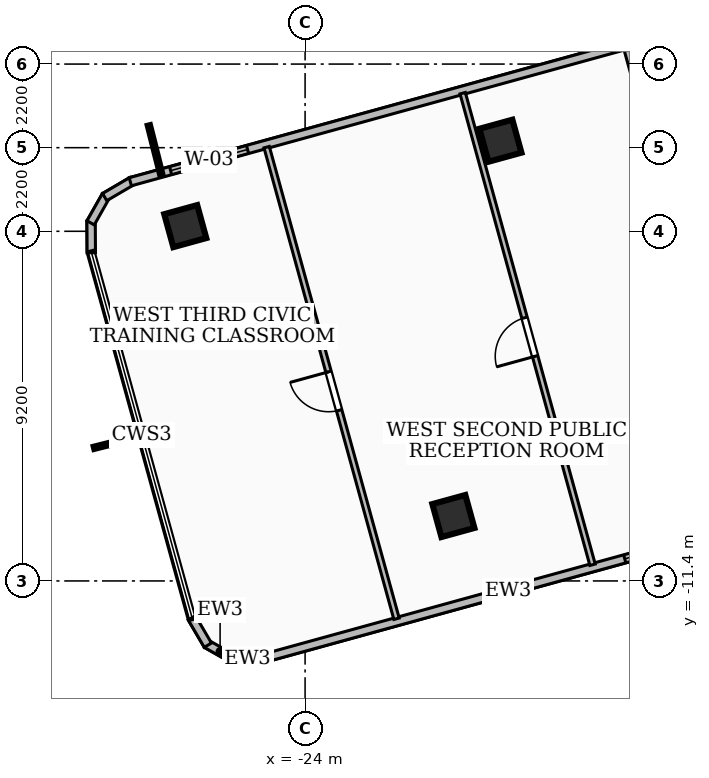
"""IFC4 building model, lengths in metres.
Left out: names, types, materials, properties, quantities, classifications, styles, units other than length and angle.
Written with IfcOpenShell. Run it as: python <this file> out.ifc"""

import sys

from ifc_helpers import new_model, si_unit, direction, frame, frame_2d, origin, origin_2d, place, context, subcontext, project, spatial, rectangle, extrude, element, fill, save


model = new_model("IFC4")
c1 = context("Model", 3, precision=1e-05, world=origin(), true_north=direction((0.0, 1.0)))
c2 = subcontext(c1, "Body", "Model", "MODEL_VIEW")
j1 = project(units=[si_unit("LENGTHUNIT", "METRE"), si_unit("PLANEANGLEUNIT", "RADIAN")], contexts=[c1])
p1 = place(None, origin())
s1 = spatial("IfcSite", under=j1, at=p1, CompositionType="ELEMENT")
p2 = place(p1, origin())
s2 = spatial("IfcBuilding", under=s1, at=p2, CompositionType="ELEMENT")
p3 = place(p2, frame((0.0, 0.0, 134.28)))
s3 = spatial("IfcBuildingStorey", under=s2, at=p3, CompositionType="ELEMENT", Elevation=134.28)
for number, where, z_axis, x_axis in (
    (1, (-18.86, 0.183, 0.0), (0.0, 0.0, 1.0), (0.964, 0.266, 0.0)),
    (2, (-27.153, -2.064, 0.0), (0.0, 0.0, 1.0), (0.964, 0.266, 0.0)),
    (3, (-20.098, -9.692, 0.0), (0.0, 0.0, 1.0), (0.964, 0.266, 0.0)),
):
    element("IfcColumn", number, at=place(p3, frame(where, z_axis=z_axis, x_axis=x_axis)), inside=s3, PredefinedType="COLUMN", context=c2, shape_type="SweptSolid", body=[
        extrude(rectangle(XDim=0.9, YDim=0.9, at=origin_2d()), origin(), (0.0, 0.0, 1.0), 3.6),
    ])
p4 = place(p3, frame((-12.166, -9.876, 0.0), z_axis=(0.0, 0.0, 1.0), x_axis=(-0.964099811745, -0.2655401156, 0.0)))
e4 = element("IfcWall", 4, at=p4, inside=s3, PredefinedType="SOLIDWALL", context=c2, shape_type="SweptSolid", body=[
    extrude(rectangle(XDim=13.459, YDim=0.22, at=frame_2d((6.729, 0.0))), origin(), (0.0, 0.0, 1.0), 3.32),
])
p5 = place(p4, frame((0.85, 0.0, 0.85)))
e5 = element("IfcOpeningElement", 5, at=p5, cuts=e4, PredefinedType="OPENING", context=c2, shape_type="SweptSolid", body=[
    extrude(rectangle(XDim=2.7, YDim=1.65, at=frame_2d((1.35, 0.825))), frame((0.0, 0.12, 0.0), z_axis=(0.0, -1.0, 0.0), x_axis=(1.0, 0.0, 0.0)), (0.0, 0.0, 1.0), 0.24),
])
p6 = place(p3, frame((-25.093, -13.443, 0.0), z_axis=(0.0, 0.0, 1.0), x_axis=(-0.999982861094, -0.005854700592, 0.0)))
e6 = element("IfcWall", 6, at=p6, inside=s3, PredefinedType="SOLIDWALL", context=c2, shape_type="SweptSolid", body=[
    extrude(rectangle(XDim=0.834, YDim=0.22, at=frame_2d((0.417, 0.0))), origin(), (0.0, 0.0, 1.0), 3.32),
])
p7 = place(p3, frame((-25.88, -13.46, 0.0), z_axis=(0.0, 0.0, 1.0), x_axis=(-0.87005199541, 0.492959963164, 0.0)))
e7 = element("IfcWall", 7, at=p7, inside=s3, PredefinedType="SOLIDWALL", context=c2, shape_type="SweptSolid", body=[
    extrude(rectangle(XDim=0.82, YDim=0.22, at=frame_2d((0.41, 0.0))), origin(), (0.0, 0.0, 1.0), 3.32),
])
p8 = place(p3, frame((-26.558, -13.09, 0.0), z_axis=(0.0, 0.0, 1.0), x_axis=(-0.506432207312, 0.862279780232, 0.0)))
e8 = element("IfcWall", 8, at=p8, inside=s3, PredefinedType="SOLIDWALL", context=c2, shape_type="SweptSolid", body=[
    extrude(rectangle(XDim=0.835, YDim=0.22, at=frame_2d((0.417, 0.0))), origin(), (0.0, 0.0, 1.0), 3.32),
])
p9 = place(p3, frame((-29.626, -2.765, 0.0), z_axis=(0.0, 0.0, 1.0), x_axis=(-0.006147424822, 0.999981104406, 0.0)))
e9 = element("IfcWall", 9, at=p9, inside=s3, PredefinedType="SOLIDWALL", context=c2, shape_type="SweptSolid", body=[
    extrude(rectangle(XDim=0.834, YDim=0.22, at=frame_2d((0.417, 0.0))), origin(), (0.0, 0.0, 1.0), 3.32),
])
p10 = place(p3, frame((-29.643, -1.978, 0.0), z_axis=(0.0, 0.0, 1.0), x_axis=(0.492057256668, 0.87056283872, 0.0)))
e10 = element("IfcWall", 10, at=p10, inside=s3, PredefinedType="SOLIDWALL", context=c2, shape_type="SweptSolid", body=[
    extrude(rectangle(XDim=0.819, YDim=0.22, at=frame_2d((0.41, 0.0))), origin(), (0.0, 0.0, 1.0), 3.32),
])
p11 = place(p3, frame((-29.274, -1.3, 0.0), z_axis=(0.0, 0.0, 1.0), x_axis=(0.862451814289, 0.506139178517, 0.0)))
e11 = element("IfcWall", 11, at=p11, inside=s3, PredefinedType="SOLIDWALL", context=c2, shape_type="SweptSolid", body=[
    extrude(rectangle(XDim=0.836, YDim=0.22, at=frame_2d((0.418, 0.0))), origin(), (0.0, 0.0, 1.0), 3.32),
])
p12 = place(p3, frame((-28.599, -0.897, 0.0), z_axis=(0.0, 0.0, 1.0), x_axis=(0.964113270695, 0.265491245185, 0.0)))
e12 = element("IfcWall", 12, at=p12, inside=s3, PredefinedType="SOLIDWALL", context=c2, shape_type="SweptSolid", body=[
    extrude(rectangle(XDim=13.458, YDim=0.22, at=frame_2d((6.729, 0.0))), origin(), (0.0, 0.0, 1.0), 3.32),
])
p13 = place(p12, frame((1.1, 0.0, 0.85)))
e13 = element("IfcOpeningElement", 13, at=p13, cuts=e12, PredefinedType="OPENING", context=c2, shape_type="SweptSolid", body=[
    extrude(rectangle(XDim=2.1, YDim=2.0, at=frame_2d((1.05, 1.0))), frame((0.0, 0.12, 0.0), z_axis=(0.0, -1.0, 0.0), x_axis=(1.0, 0.0, 0.0)), (0.0, 0.0, 1.0), 0.24),
])
p14 = place(p3, frame((-10.999, -13.879, 0.0), z_axis=(0.0, 0.0, 1.0), x_axis=(-0.26558288107, 0.964088031915, 0.0)))
e14 = element("IfcWall", 14, at=p14, inside=s3, PredefinedType="PARTITIONING", context=c2, shape_type="SweptSolid", body=[
    extrude(rectangle(XDim=20.479, YDim=0.145, at=frame_2d((10.24, 0.0))), origin(), (0.0, 0.0, 1.0), 2.55),
])
p15 = place(p14, frame((9.86, 0.0, 0.0)))
e15 = element("IfcOpeningElement", 15, at=p15, cuts=e14, PredefinedType="OPENING", context=c2, shape_type="SweptSolid", body=[
    extrude(rectangle(XDim=1.2, YDim=2.1, at=frame_2d((0.6, 1.05))), frame((0.0, 0.083, 0.0), z_axis=(0.0, -1.0, 0.0), x_axis=(1.0, 0.0, 0.0)), (0.0, 0.0, 1.0), 0.165),
])
p16 = place(p3, frame((-16.436, -10.974, 0.0), z_axis=(0.0, 0.0, 1.0), x_axis=(-0.265498602623, 0.964111244621, 0.0)))
e16 = element("IfcWall", 16, at=p16, inside=s3, PredefinedType="PARTITIONING", context=c2, shape_type="SweptSolid", body=[
    extrude(rectangle(XDim=12.87, YDim=0.145, at=frame_2d((6.435, 0.0))), origin(), (0.0, 0.0, 1.0), 2.55),
])
p17 = place(p16, frame((5.69, 0.0, 0.0)))
e17 = element("IfcOpeningElement", 17, at=p17, cuts=e16, PredefinedType="OPENING", context=c2, shape_type="SweptSolid", body=[
    extrude(rectangle(XDim=1.05, YDim=2.08, at=frame_2d((0.525, 1.04))), frame((0.0, 0.083, 0.0), z_axis=(0.0, -1.0, 0.0), x_axis=(1.0, 0.0, 0.0)), (0.0, 0.0, 1.0), 0.165),
])
p18 = place(p3, frame((-21.594, -12.395, 0.0), z_axis=(0.0, 0.0, 1.0), x_axis=(-0.265484036431, 0.964115255766, 0.0)))
e18 = element("IfcWall", 18, at=p18, inside=s3, PredefinedType="PARTITIONING", context=c2, shape_type="SweptSolid", body=[
    extrude(rectangle(XDim=12.871, YDim=0.145, at=frame_2d((6.436, 0.0))), origin(), (0.0, 0.0, 1.0), 2.55),
])
p19 = place(p18, frame((5.689, 0.0, 0.0)))
e19 = element("IfcOpeningElement", 19, at=p19, cuts=e18, PredefinedType="OPENING", context=c2, shape_type="SweptSolid", body=[
    extrude(rectangle(XDim=1.05, YDim=2.08, at=frame_2d((0.525, 1.04))), frame((0.0, 0.083, 0.0), z_axis=(0.0, -1.0, 0.0), x_axis=(1.0, 0.0, 0.0)), (0.0, 0.0, 1.0), 0.165),
])
p20 = place(p5, origin())
e20 = element("IfcWindow", 20, at=p20, inside=s3, PartitioningType="SINGLE_PANEL", PredefinedType="WINDOW", context=c2, shape_type="SweptSolid", body=[
    extrude(rectangle(XDim=2.7, YDim=1.65, at=frame_2d((1.35, 0.825))), frame((0.0, 0.03, 0.0), z_axis=(0.0, -1.0, 0.0), x_axis=(1.0, 0.0, 0.0)), (0.0, 0.0, 1.0), 0.06),
])
fill(e5, e20)
p21 = place(p13, origin())
e21 = element("IfcWindow", 21, at=p21, inside=s3, PartitioningType="SINGLE_PANEL", PredefinedType="WINDOW", context=c2, shape_type="SweptSolid", body=[
    extrude(rectangle(XDim=2.1, YDim=2.0, at=frame_2d((1.05, 1.0))), frame((0.0, 0.03, 0.0), z_axis=(0.0, -1.0, 0.0), x_axis=(1.0, 0.0, 0.0)), (0.0, 0.0, 1.0), 0.06),
])
fill(e13, e21)
p22 = place(p17, origin())
e22 = element("IfcDoor", 22, at=p22, inside=s3, OperationType="SINGLE_SWING_LEFT", PredefinedType="DOOR", context=c2, shape_type="SweptSolid", body=[
    extrude(rectangle(XDim=1.05, YDim=2.08, at=frame_2d((0.525, 1.04))), frame((0.0, 0.025, 0.0), z_axis=(0.0, -1.0, 0.0), x_axis=(1.0, 0.0, 0.0)), (0.0, 0.0, 1.0), 0.05),
])
fill(e17, e22)
p23 = place(p19, origin())
e23 = element("IfcDoor", 23, at=p23, inside=s3, OperationType="SINGLE_SWING_RIGHT", PredefinedType="DOOR", context=c2, shape_type="SweptSolid", body=[
    extrude(rectangle(XDim=1.05, YDim=2.08, at=frame_2d((0.525, 1.04))), frame((0.0, 0.025, 0.0), z_axis=(0.0, -1.0, 0.0), x_axis=(1.0, 0.0, 0.0)), (0.0, 0.0, 1.0), 0.05),
])
fill(e19, e23)
save(model, sys.argv[1])
